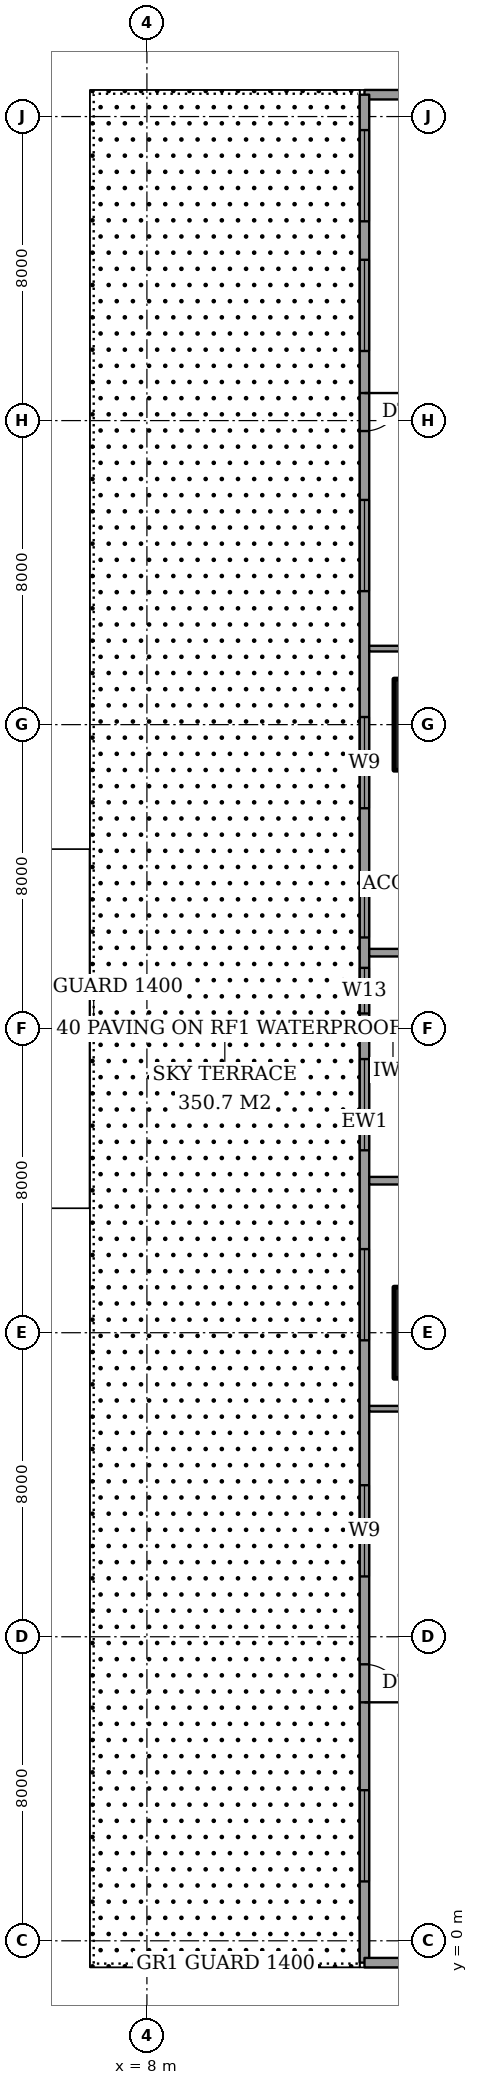
"""IFC4 building model, lengths in metres.
Left out: names, types, materials, properties, quantities, classifications, styles, units other than length and angle.
Written with IfcOpenShell. Run it as: python <this file> out.ifc"""

import sys

from ifc_helpers import new_model, si_unit, direction, frame, frame_2d, origin, origin_2d, place, context, subcontext, project, spatial, rectangle, extrude, element, fill, save


model = new_model("IFC4")
c1 = context("Model", 3, precision=1e-05, world=origin(), true_north=direction((0.0, 1.0)))
c2 = subcontext(c1, "Body", "Model", "MODEL_VIEW")
j1 = project(units=[si_unit("LENGTHUNIT", "METRE"), si_unit("PLANEANGLEUNIT", "RADIAN")], contexts=[c1])
p1 = place(None, origin())
s1 = spatial("IfcSite", under=j1, at=p1, CompositionType="ELEMENT")
p2 = place(p1, origin())
s2 = spatial("IfcBuilding", under=s1, at=p2, CompositionType="ELEMENT")
p3 = place(p2, frame((0.0, 0.0, 221.8)))
s3 = spatial("IfcBuildingStorey", under=s2, at=p3, CompositionType="ELEMENT", Elevation=221.8)
for number, where, z_axis, x_axis in (
    (1, (16.0, 16.0, 0.0), (0.0, 0.0, 1.0), (1.0, 0.0, 0.0)),
    (2, (16.0, 32.0, 0.0), (0.0, 0.0, 1.0), (1.0, 0.0, 0.0)),
):
    element("IfcColumn", number, at=place(p3, frame(where, z_axis=z_axis, x_axis=x_axis)), inside=s3, PredefinedType="COLUMN", context=c2, shape_type="SweptSolid", body=[
        extrude(rectangle(XDim=3.0, YDim=2.4, at=origin_2d()), origin(), (0.0, 0.0, 1.0), 3.6),
    ])
p4 = place(p3, frame((24.575, 48.575, 0.0), z_axis=(0.0, 0.0, 1.0), x_axis=(-1.0, 0.0, 0.0)))
e3 = element("IfcWall", 3, at=p4, inside=s3, PredefinedType="SOLIDWALL", context=c2, shape_type="SweptSolid", body=[
    extrude(rectangle(XDim=10.85, YDim=0.25, at=frame_2d((5.425, 0.0))), origin(), (0.0, 0.0, 1.0), 3.6),
])
p5 = place(p4, frame((3.6, 0.0, 0.2)))
e4 = element("IfcOpeningElement", 4, at=p5, cuts=e3, PredefinedType="OPENING", context=c2, shape_type="SweptSolid", body=[
    extrude(rectangle(XDim=2.4, YDim=2.4, at=frame_2d((1.2, 1.2))), frame((0.0, 0.135, 0.0), z_axis=(0.0, -1.0, 0.0), x_axis=(1.0, 0.0, 0.0)), (0.0, 0.0, 1.0), 0.27),
])
p6 = place(p3, frame((13.725, 48.575, 0.0), z_axis=(0.0, 0.0, 1.0), x_axis=(0.0, -1.0, 0.0)))
e5 = element("IfcWall", 5, at=p6, inside=s3, PredefinedType="SOLIDWALL", context=c2, shape_type="SweptSolid", body=[
    extrude(rectangle(XDim=49.15, YDim=0.25, at=frame_2d((24.575, 0.0))), origin(), (0.0, 0.0, 1.0), 3.6),
])
p7 = place(p6, frame((7.85, 0.0, 0.0)))
e6 = element("IfcOpeningElement", 6, at=p7, cuts=e5, PredefinedType="OPENING", context=c2, shape_type="SweptSolid", body=[
    extrude(rectangle(XDim=1.0, YDim=2.4, at=frame_2d((0.5, 1.2))), frame((0.0, 0.135, 0.0), z_axis=(0.0, -1.0, 0.0), x_axis=(1.0, 0.0, 0.0)), (0.0, 0.0, 1.0), 0.27),
])
p8 = place(p6, frame((0.931, 0.0, 0.2)))
e7 = element("IfcOpeningElement", 7, at=p8, cuts=e5, PredefinedType="OPENING", context=c2, shape_type="SweptSolid", body=[
    extrude(rectangle(XDim=2.4, YDim=2.4, at=frame_2d((1.2, 1.2))), frame((0.0, 0.135, 0.0), z_axis=(0.0, -1.0, 0.0), x_axis=(1.0, 0.0, 0.0)), (0.0, 0.0, 1.0), 0.27),
])
p9 = place(p6, frame((4.344, 0.0, 0.2)))
e8 = element("IfcOpeningElement", 8, at=p9, cuts=e5, PredefinedType="OPENING", context=c2, shape_type="SweptSolid", body=[
    extrude(rectangle(XDim=2.4, YDim=2.4, at=frame_2d((1.2, 1.2))), frame((0.0, 0.135, 0.0), z_axis=(0.0, -1.0, 0.0), x_axis=(1.0, 0.0, 0.0)), (0.0, 0.0, 1.0), 0.27),
])
p10 = place(p6, frame((10.663, 0.0, 0.2)))
e9 = element("IfcOpeningElement", 9, at=p10, cuts=e5, PredefinedType="OPENING", context=c2, shape_type="SweptSolid", body=[
    extrude(rectangle(XDim=2.4, YDim=2.4, at=frame_2d((1.2, 1.2))), frame((0.0, 0.135, 0.0), z_axis=(0.0, -1.0, 0.0), x_axis=(1.0, 0.0, 0.0)), (0.0, 0.0, 1.0), 0.27),
])
p11 = place(p6, frame((16.375, 0.0, 0.2)))
e10 = element("IfcOpeningElement", 10, at=p11, cuts=e5, PredefinedType="OPENING", context=c2, shape_type="SweptSolid", body=[
    extrude(rectangle(XDim=2.4, YDim=2.4, at=frame_2d((1.2, 1.2))), frame((0.0, 0.135, 0.0), z_axis=(0.0, -1.0, 0.0), x_axis=(1.0, 0.0, 0.0)), (0.0, 0.0, 1.0), 0.27),
])
p12 = place(p6, frame((20.975, 0.0, 0.2)))
e11 = element("IfcOpeningElement", 11, at=p12, cuts=e5, PredefinedType="OPENING", context=c2, shape_type="SweptSolid", body=[
    extrude(rectangle(XDim=1.2, YDim=2.4, at=frame_2d((0.6, 1.2))), frame((0.0, 0.135, 0.0), z_axis=(0.0, -1.0, 0.0), x_axis=(1.0, 0.0, 0.0)), (0.0, 0.0, 1.0), 0.27),
])
p13 = place(p6, frame((22.975, 0.0, 0.2)))
e12 = element("IfcOpeningElement", 12, at=p13, cuts=e5, PredefinedType="OPENING", context=c2, shape_type="SweptSolid", body=[
    extrude(rectangle(XDim=1.2, YDim=2.4, at=frame_2d((0.6, 1.2))), frame((0.0, 0.135, 0.0), z_axis=(0.0, -1.0, 0.0), x_axis=(1.0, 0.0, 0.0)), (0.0, 0.0, 1.0), 0.27),
])
p14 = place(p6, frame((25.375, 0.0, 0.2)))
e13 = element("IfcOpeningElement", 13, at=p14, cuts=e5, PredefinedType="OPENING", context=c2, shape_type="SweptSolid", body=[
    extrude(rectangle(XDim=2.4, YDim=2.4, at=frame_2d((1.2, 1.2))), frame((0.0, 0.135, 0.0), z_axis=(0.0, -1.0, 0.0), x_axis=(1.0, 0.0, 0.0)), (0.0, 0.0, 1.0), 0.27),
])
p15 = place(p6, frame((30.375, 0.0, 0.2)))
e14 = element("IfcOpeningElement", 14, at=p15, cuts=e5, PredefinedType="OPENING", context=c2, shape_type="SweptSolid", body=[
    extrude(rectangle(XDim=2.4, YDim=2.4, at=frame_2d((1.2, 1.2))), frame((0.0, 0.135, 0.0), z_axis=(0.0, -1.0, 0.0), x_axis=(1.0, 0.0, 0.0)), (0.0, 0.0, 1.0), 0.27),
])
p16 = place(p6, frame((41.3, 0.0, 0.0)))
e15 = element("IfcOpeningElement", 15, at=p16, cuts=e5, PredefinedType="OPENING", context=c2, shape_type="SweptSolid", body=[
    extrude(rectangle(XDim=1.0, YDim=2.4, at=frame_2d((0.5, 1.2))), frame((0.0, 0.135, 0.0), z_axis=(0.0, -1.0, 0.0), x_axis=(1.0, 0.0, 0.0)), (0.0, 0.0, 1.0), 0.27),
])
p17 = place(p6, frame((36.587, 0.0, 0.2)))
e16 = element("IfcOpeningElement", 16, at=p17, cuts=e5, PredefinedType="OPENING", context=c2, shape_type="SweptSolid", body=[
    extrude(rectangle(XDim=2.4, YDim=2.4, at=frame_2d((1.2, 1.2))), frame((0.0, 0.135, 0.0), z_axis=(0.0, -1.0, 0.0), x_axis=(1.0, 0.0, 0.0)), (0.0, 0.0, 1.0), 0.27),
])
p18 = place(p6, frame((44.613, 0.0, 0.2)))
e17 = element("IfcOpeningElement", 17, at=p18, cuts=e5, PredefinedType="OPENING", context=c2, shape_type="SweptSolid", body=[
    extrude(rectangle(XDim=2.4, YDim=2.4, at=frame_2d((1.2, 1.2))), frame((0.0, 0.135, 0.0), z_axis=(0.0, -1.0, 0.0), x_axis=(1.0, 0.0, 0.0)), (0.0, 0.0, 1.0), 0.27),
])
p19 = place(p3, frame((13.725, -0.575, 0.0), z_axis=(0.0, 0.0, 1.0), x_axis=(1.0, 0.0, 0.0)))
e18 = element("IfcWall", 18, at=p19, inside=s3, PredefinedType="SOLIDWALL", context=c2, shape_type="SweptSolid", body=[
    extrude(rectangle(XDim=10.85, YDim=0.25, at=frame_2d((5.425, 0.0))), origin(), (0.0, 0.0, 1.0), 3.6),
])
p20 = place(p19, frame((4.85, 0.0, 0.2)))
e19 = element("IfcOpeningElement", 19, at=p20, cuts=e18, PredefinedType="OPENING", context=c2, shape_type="SweptSolid", body=[
    extrude(rectangle(XDim=2.4, YDim=2.4, at=frame_2d((1.2, 1.2))), frame((0.0, 0.135, 0.0), z_axis=(0.0, -1.0, 0.0), x_axis=(1.0, 0.0, 0.0)), (0.0, 0.0, 1.0), 0.27),
])
p21 = place(p3, frame((13.85, 14.0, 0.0), z_axis=(0.0, 0.0, 1.0), x_axis=(1.0, 0.0, 0.0)))
e20 = element("IfcWall", 20, at=p21, inside=s3, PredefinedType="PARTITIONING", context=c2, shape_type="SweptSolid", body=[
    extrude(rectangle(XDim=10.15, YDim=0.15, at=frame_2d((5.075, 0.0))), origin(), (0.0, 0.0, 1.0), 3.25),
])
p22 = place(p21, frame((4.175, 0.0, 0.0)))
e21 = element("IfcOpeningElement", 21, at=p22, cuts=e20, PredefinedType="OPENING", context=c2, shape_type="SweptSolid", body=[
    extrude(rectangle(XDim=1.8, YDim=2.1, at=frame_2d((0.9, 1.05))), frame((0.0, 0.085, 0.0), z_axis=(0.0, -1.0, 0.0), x_axis=(1.0, 0.0, 0.0)), (0.0, 0.0, 1.0), 0.17),
])
p23 = place(p3, frame((13.85, 20.0, 0.0), z_axis=(0.0, 0.0, 1.0), x_axis=(1.0, 0.0, 0.0)))
e22 = element("IfcWall", 22, at=p23, inside=s3, PredefinedType="PARTITIONING", context=c2, shape_type="SweptSolid", body=[
    extrude(rectangle(XDim=5.05, YDim=0.2, at=frame_2d((2.525, 0.0))), origin(), (0.0, 0.0, 1.0), 3.25),
])
p24 = place(p3, frame((13.85, 24.0, 0.0), z_axis=(0.0, 0.0, 1.0), x_axis=(1.0, 0.0, 0.0)))
e23 = element("IfcWall", 23, at=p24, inside=s3, PredefinedType="PARTITIONING", context=c2, shape_type="SweptSolid", body=[
    extrude(rectangle(XDim=1.25, YDim=0.2, at=frame_2d((0.625, 0.0))), origin(), (0.0, 0.0, 1.0), 3.25),
])
for number, where, z_axis, x_axis in (
    (24, (13.85, 26.0, 0.0), (0.0, 0.0, 1.0), (1.0, 0.0, 0.0)),
    (25, (13.85, 28.0, 0.0), (0.0, 0.0, 1.0), (1.0, 0.0, 0.0)),
):
    element("IfcWall", number, at=place(p3, frame(where, z_axis=z_axis, x_axis=x_axis)), inside=s3, PredefinedType="PARTITIONING", context=c2, shape_type="SweptSolid", body=[
        extrude(rectangle(XDim=5.05, YDim=0.2, at=frame_2d((2.525, 0.0))), origin(), (0.0, 0.0, 1.0), 3.25),
    ])
p25 = place(p3, frame((13.85, 34.0, 0.0), z_axis=(0.0, 0.0, 1.0), x_axis=(1.0, 0.0, 0.0)))
e26 = element("IfcWall", 26, at=p25, inside=s3, PredefinedType="PARTITIONING", context=c2, shape_type="SweptSolid", body=[
    extrude(rectangle(XDim=10.15, YDim=0.15, at=frame_2d((5.075, 0.0))), origin(), (0.0, 0.0, 1.0), 3.25),
])
p26 = place(p25, frame((4.175, 0.0, 0.0)))
e27 = element("IfcOpeningElement", 27, at=p26, cuts=e26, PredefinedType="OPENING", context=c2, shape_type="SweptSolid", body=[
    extrude(rectangle(XDim=1.8, YDim=2.1, at=frame_2d((0.9, 1.05))), frame((0.0, 0.085, 0.0), z_axis=(0.0, -1.0, 0.0), x_axis=(1.0, 0.0, 0.0)), (0.0, 0.0, 1.0), 0.17),
])
p27 = place(p7, origin())
e28 = element("IfcDoor", 28, at=p27, inside=s3, OperationType="SINGLE_SWING_RIGHT", PredefinedType="DOOR", context=c2, shape_type="SweptSolid", body=[
    extrude(rectangle(XDim=1.0, YDim=2.4, at=frame_2d((0.5, 1.2))), frame((0.0, 0.025, 0.0), z_axis=(0.0, -1.0, 0.0), x_axis=(1.0, 0.0, 0.0)), (0.0, 0.0, 1.0), 0.05),
])
fill(e6, e28)
p28 = place(p8, origin())
e29 = element("IfcWindow", 29, at=p28, inside=s3, PartitioningType="SINGLE_PANEL", PredefinedType="WINDOW", context=c2, shape_type="SweptSolid", body=[
    extrude(rectangle(XDim=2.4, YDim=2.4, at=frame_2d((1.2, 1.2))), frame((0.0, 0.03, 0.0), z_axis=(0.0, -1.0, 0.0), x_axis=(1.0, 0.0, 0.0)), (0.0, 0.0, 1.0), 0.06),
])
fill(e7, e29)
p29 = place(p9, origin())
e30 = element("IfcWindow", 30, at=p29, inside=s3, PartitioningType="SINGLE_PANEL", PredefinedType="WINDOW", context=c2, shape_type="SweptSolid", body=[
    extrude(rectangle(XDim=2.4, YDim=2.4, at=frame_2d((1.2, 1.2))), frame((0.0, 0.03, 0.0), z_axis=(0.0, -1.0, 0.0), x_axis=(1.0, 0.0, 0.0)), (0.0, 0.0, 1.0), 0.06),
])
fill(e8, e30)
p30 = place(p10, origin())
e31 = element("IfcWindow", 31, at=p30, inside=s3, PartitioningType="SINGLE_PANEL", PredefinedType="WINDOW", context=c2, shape_type="SweptSolid", body=[
    extrude(rectangle(XDim=2.4, YDim=2.4, at=frame_2d((1.2, 1.2))), frame((0.0, 0.03, 0.0), z_axis=(0.0, -1.0, 0.0), x_axis=(1.0, 0.0, 0.0)), (0.0, 0.0, 1.0), 0.06),
])
fill(e9, e31)
p31 = place(p11, origin())
e32 = element("IfcWindow", 32, at=p31, inside=s3, PartitioningType="SINGLE_PANEL", PredefinedType="WINDOW", context=c2, shape_type="SweptSolid", body=[
    extrude(rectangle(XDim=2.4, YDim=2.4, at=frame_2d((1.2, 1.2))), frame((0.0, 0.03, 0.0), z_axis=(0.0, -1.0, 0.0), x_axis=(1.0, 0.0, 0.0)), (0.0, 0.0, 1.0), 0.06),
])
fill(e10, e32)
p32 = place(p12, origin())
e33 = element("IfcWindow", 33, at=p32, inside=s3, PartitioningType="SINGLE_PANEL", PredefinedType="WINDOW", context=c2, shape_type="SweptSolid", body=[
    extrude(rectangle(XDim=1.2, YDim=2.4, at=frame_2d((0.6, 1.2))), frame((0.0, 0.03, 0.0), z_axis=(0.0, -1.0, 0.0), x_axis=(1.0, 0.0, 0.0)), (0.0, 0.0, 1.0), 0.06),
])
fill(e11, e33)
p33 = place(p13, origin())
e34 = element("IfcWindow", 34, at=p33, inside=s3, PartitioningType="SINGLE_PANEL", PredefinedType="WINDOW", context=c2, shape_type="SweptSolid", body=[
    extrude(rectangle(XDim=1.2, YDim=2.4, at=frame_2d((0.6, 1.2))), frame((0.0, 0.03, 0.0), z_axis=(0.0, -1.0, 0.0), x_axis=(1.0, 0.0, 0.0)), (0.0, 0.0, 1.0), 0.06),
])
fill(e12, e34)
p34 = place(p14, origin())
e35 = element("IfcWindow", 35, at=p34, inside=s3, PartitioningType="SINGLE_PANEL", PredefinedType="WINDOW", context=c2, shape_type="SweptSolid", body=[
    extrude(rectangle(XDim=2.4, YDim=2.4, at=frame_2d((1.2, 1.2))), frame((0.0, 0.03, 0.0), z_axis=(0.0, -1.0, 0.0), x_axis=(1.0, 0.0, 0.0)), (0.0, 0.0, 1.0), 0.06),
])
fill(e13, e35)
p35 = place(p15, origin())
e36 = element("IfcWindow", 36, at=p35, inside=s3, PartitioningType="SINGLE_PANEL", PredefinedType="WINDOW", context=c2, shape_type="SweptSolid", body=[
    extrude(rectangle(XDim=2.4, YDim=2.4, at=frame_2d((1.2, 1.2))), frame((0.0, 0.03, 0.0), z_axis=(0.0, -1.0, 0.0), x_axis=(1.0, 0.0, 0.0)), (0.0, 0.0, 1.0), 0.06),
])
fill(e14, e36)
p36 = place(p16, origin())
e37 = element("IfcDoor", 37, at=p36, inside=s3, OperationType="SINGLE_SWING_LEFT", PredefinedType="DOOR", context=c2, shape_type="SweptSolid", body=[
    extrude(rectangle(XDim=1.0, YDim=2.4, at=frame_2d((0.5, 1.2))), frame((0.0, 0.025, 0.0), z_axis=(0.0, -1.0, 0.0), x_axis=(1.0, 0.0, 0.0)), (0.0, 0.0, 1.0), 0.05),
])
fill(e15, e37)
p37 = place(p17, origin())
e38 = element("IfcWindow", 38, at=p37, inside=s3, PartitioningType="SINGLE_PANEL", PredefinedType="WINDOW", context=c2, shape_type="SweptSolid", body=[
    extrude(rectangle(XDim=2.4, YDim=2.4, at=frame_2d((1.2, 1.2))), frame((0.0, 0.03, 0.0), z_axis=(0.0, -1.0, 0.0), x_axis=(1.0, 0.0, 0.0)), (0.0, 0.0, 1.0), 0.06),
])
fill(e16, e38)
p38 = place(p18, origin())
e39 = element("IfcWindow", 39, at=p38, inside=s3, PartitioningType="SINGLE_PANEL", PredefinedType="WINDOW", context=c2, shape_type="SweptSolid", body=[
    extrude(rectangle(XDim=2.4, YDim=2.4, at=frame_2d((1.2, 1.2))), frame((0.0, 0.03, 0.0), z_axis=(0.0, -1.0, 0.0), x_axis=(1.0, 0.0, 0.0)), (0.0, 0.0, 1.0), 0.06),
])
fill(e17, e39)
save(model, sys.argv[1])
